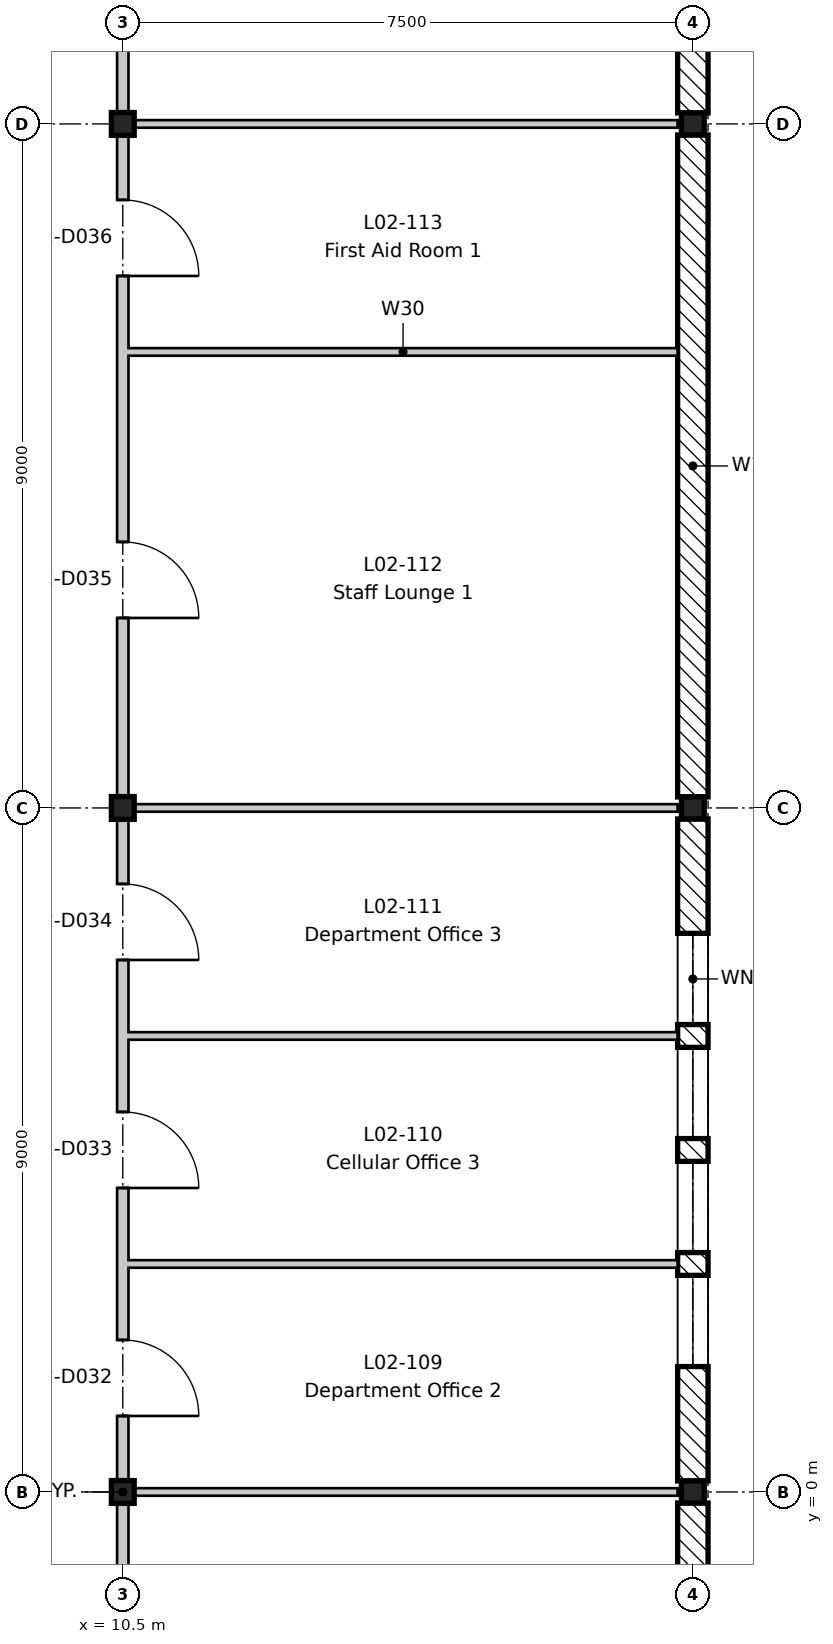
"""IFC4 building model, lengths in metres.
Left out: names, types, materials, properties, quantities, classifications, styles, units other than length and angle.
Written with IfcOpenShell. Run it as: python <this file> out.ifc"""

import sys

from ifc_helpers import new_model, si_unit, direction, frame, frame_2d, origin, origin_2d, place, context, subcontext, project, spatial, rectangle, i_section, extrude, element, fill, save


model = new_model("IFC4")
c1 = context("Model", 3, precision=1e-05, world=origin(), true_north=direction((0.0, 1.0)))
c2 = subcontext(c1, "Body", "Model", "MODEL_VIEW")
j1 = project(units=[si_unit("LENGTHUNIT", "METRE"), si_unit("PLANEANGLEUNIT", "RADIAN")], contexts=[c1])
p1 = place(None, origin())
s1 = spatial("IfcSite", under=j1, at=p1, CompositionType="ELEMENT")
p2 = place(p1, origin())
s2 = spatial("IfcBuilding", under=s1, at=p2, CompositionType="ELEMENT")
p3 = place(p2, frame((0.0, 0.0, 9.9)))
s3 = spatial("IfcBuildingStorey", under=s2, at=p3, CompositionType="ELEMENT", Elevation=9.9)
for number, where, z_axis, x_axis in (
    (1, (10.5, 0.0, -0.2), (0.0, 0.0, 1.0), (1.0, 0.0, 0.0)),
    (2, (10.5, 9.0, -0.2), (0.0, 0.0, 1.0), (1.0, 0.0, 0.0)),
    (3, (10.5, 18.0, -0.2), (0.0, 0.0, 1.0), (1.0, 0.0, 0.0)),
):
    element("IfcColumn", number, at=place(p3, frame(where, z_axis=z_axis, x_axis=x_axis)), inside=s3, PredefinedType="COLUMN", context=c2, shape_type="SweptSolid", body=[
        extrude(i_section(OverallWidth=0.3, OverallDepth=0.3, WebThickness=0.011, FlangeThickness=0.019, FilletRadius=0.027, at=origin_2d()), origin(), (0.0, 0.0, 1.0), 4.5),
    ])
for number, where, z_axis, x_axis in (
    (4, (18.0, 0.0, -0.2), (0.0, 0.0, 1.0), (1.0, 0.0, 0.0)),
    (5, (18.0, 9.0, -0.2), (0.0, 0.0, 1.0), (1.0, 0.0, 0.0)),
    (6, (18.0, 18.0, -0.2), (0.0, 0.0, 1.0), (1.0, 0.0, 0.0)),
):
    element("IfcColumn", number, at=place(p3, frame(where, z_axis=z_axis, x_axis=x_axis)), inside=s3, PredefinedType="COLUMN", context=c2, shape_type="SweptSolid", body=[
        extrude(i_section(OverallWidth=0.3, OverallDepth=0.29, WebThickness=0.009, FlangeThickness=0.014, FilletRadius=0.027, at=origin_2d()), origin(), (0.0, 0.0, 1.0), 4.5),
    ])
p4 = place(p3, frame((18.0, -0.145, 0.0), z_axis=(0.0, 0.0, 1.0), x_axis=(0.0, -1.0, 0.0)))
e7 = element("IfcWall", 7, at=p4, inside=s3, PredefinedType="STANDARD", context=c2, shape_type="SweptSolid", body=[
    extrude(rectangle(XDim=8.71, YDim=0.4, at=frame_2d((4.355, 0.0))), origin(), (0.0, 0.0, 1.0), 3.9),
])
p5 = place(p4, frame((6.005, 0.0, 0.6)))
e8 = element("IfcOpeningElement", 8, at=p5, cuts=e7, PredefinedType="OPENING", context=c2, shape_type="SweptSolid", body=[
    extrude(rectangle(XDim=1.2, YDim=3.0, at=frame_2d((0.6, 1.5))), frame((0.0, 0.21, 0.0), z_axis=(0.0, -1.0, 0.0), x_axis=(1.0, 0.0, 0.0)), (0.0, 0.0, 1.0), 0.42),
])
p6 = place(p4, frame((4.505, 0.0, 0.6)))
e9 = element("IfcOpeningElement", 9, at=p6, cuts=e7, PredefinedType="OPENING", context=c2, shape_type="SweptSolid", body=[
    extrude(rectangle(XDim=1.2, YDim=3.0, at=frame_2d((0.6, 1.5))), frame((0.0, 0.21, 0.0), z_axis=(0.0, -1.0, 0.0), x_axis=(1.0, 0.0, 0.0)), (0.0, 0.0, 1.0), 0.42),
])
p7 = place(p4, frame((3.005, 0.0, 0.6)))
e10 = element("IfcOpeningElement", 10, at=p7, cuts=e7, PredefinedType="OPENING", context=c2, shape_type="SweptSolid", body=[
    extrude(rectangle(XDim=1.2, YDim=3.0, at=frame_2d((0.6, 1.5))), frame((0.0, 0.21, 0.0), z_axis=(0.0, -1.0, 0.0), x_axis=(1.0, 0.0, 0.0)), (0.0, 0.0, 1.0), 0.42),
])
p8 = place(p4, frame((1.505, 0.0, 0.6)))
e11 = element("IfcOpeningElement", 11, at=p8, cuts=e7, PredefinedType="OPENING", context=c2, shape_type="SweptSolid", body=[
    extrude(rectangle(XDim=1.2, YDim=3.0, at=frame_2d((0.6, 1.5))), frame((0.0, 0.21, 0.0), z_axis=(0.0, -1.0, 0.0), x_axis=(1.0, 0.0, 0.0)), (0.0, 0.0, 1.0), 0.42),
])
p9 = place(p3, frame((18.0, 8.855, 0.0), z_axis=(0.0, 0.0, 1.0), x_axis=(0.0, -1.0, 0.0)))
e12 = element("IfcWall", 12, at=p9, inside=s3, PredefinedType="STANDARD", context=c2, shape_type="SweptSolid", body=[
    extrude(rectangle(XDim=8.71, YDim=0.4, at=frame_2d((4.355, 0.0))), origin(), (0.0, 0.0, 1.0), 3.9),
])
p10 = place(p9, frame((6.005, 0.0, 0.6)))
e13 = element("IfcOpeningElement", 13, at=p10, cuts=e12, PredefinedType="OPENING", context=c2, shape_type="SweptSolid", body=[
    extrude(rectangle(XDim=1.2, YDim=3.0, at=frame_2d((0.6, 1.5))), frame((0.0, 0.21, 0.0), z_axis=(0.0, -1.0, 0.0), x_axis=(1.0, 0.0, 0.0)), (0.0, 0.0, 1.0), 0.42),
])
p11 = place(p9, frame((4.505, 0.0, 0.6)))
e14 = element("IfcOpeningElement", 14, at=p11, cuts=e12, PredefinedType="OPENING", context=c2, shape_type="SweptSolid", body=[
    extrude(rectangle(XDim=1.2, YDim=3.0, at=frame_2d((0.6, 1.5))), frame((0.0, 0.21, 0.0), z_axis=(0.0, -1.0, 0.0), x_axis=(1.0, 0.0, 0.0)), (0.0, 0.0, 1.0), 0.42),
])
p12 = place(p9, frame((3.005, 0.0, 0.6)))
e15 = element("IfcOpeningElement", 15, at=p12, cuts=e12, PredefinedType="OPENING", context=c2, shape_type="SweptSolid", body=[
    extrude(rectangle(XDim=1.2, YDim=3.0, at=frame_2d((0.6, 1.5))), frame((0.0, 0.21, 0.0), z_axis=(0.0, -1.0, 0.0), x_axis=(1.0, 0.0, 0.0)), (0.0, 0.0, 1.0), 0.42),
])
p13 = place(p9, frame((1.505, 0.0, 0.6)))
e16 = element("IfcOpeningElement", 16, at=p13, cuts=e12, PredefinedType="OPENING", context=c2, shape_type="SweptSolid", body=[
    extrude(rectangle(XDim=1.2, YDim=3.0, at=frame_2d((0.6, 1.5))), frame((0.0, 0.21, 0.0), z_axis=(0.0, -1.0, 0.0), x_axis=(1.0, 0.0, 0.0)), (0.0, 0.0, 1.0), 0.42),
])
p14 = place(p3, frame((18.0, 17.855, 0.0), z_axis=(0.0, 0.0, 1.0), x_axis=(0.0, -1.0, 0.0)))
e17 = element("IfcWall", 17, at=p14, inside=s3, PredefinedType="STANDARD", context=c2, shape_type="SweptSolid", body=[
    extrude(rectangle(XDim=8.71, YDim=0.4, at=frame_2d((4.355, 0.0))), origin(), (0.0, 0.0, 1.0), 3.9),
])
p15 = place(p3, frame((18.0, 26.855, 0.0), z_axis=(0.0, 0.0, 1.0), x_axis=(0.0, -1.0, 0.0)))
e18 = element("IfcWall", 18, at=p15, inside=s3, PredefinedType="STANDARD", context=c2, shape_type="SweptSolid", body=[
    extrude(rectangle(XDim=8.71, YDim=0.4, at=frame_2d((4.355, 0.0))), origin(), (0.0, 0.0, 1.0), 3.9),
])
p16 = place(p15, frame((6.005, 0.0, 0.6)))
e19 = element("IfcOpeningElement", 19, at=p16, cuts=e18, PredefinedType="OPENING", context=c2, shape_type="SweptSolid", body=[
    extrude(rectangle(XDim=1.2, YDim=3.0, at=frame_2d((0.6, 1.5))), frame((0.0, 0.21, 0.0), z_axis=(0.0, -1.0, 0.0), x_axis=(1.0, 0.0, 0.0)), (0.0, 0.0, 1.0), 0.42),
])
p17 = place(p15, frame((4.505, 0.0, 0.6)))
e20 = element("IfcOpeningElement", 20, at=p17, cuts=e18, PredefinedType="OPENING", context=c2, shape_type="SweptSolid", body=[
    extrude(rectangle(XDim=1.2, YDim=3.0, at=frame_2d((0.6, 1.5))), frame((0.0, 0.21, 0.0), z_axis=(0.0, -1.0, 0.0), x_axis=(1.0, 0.0, 0.0)), (0.0, 0.0, 1.0), 0.42),
])
p18 = place(p15, frame((3.005, 0.0, 0.6)))
e21 = element("IfcOpeningElement", 21, at=p18, cuts=e18, PredefinedType="OPENING", context=c2, shape_type="SweptSolid", body=[
    extrude(rectangle(XDim=1.2, YDim=3.0, at=frame_2d((0.6, 1.5))), frame((0.0, 0.21, 0.0), z_axis=(0.0, -1.0, 0.0), x_axis=(1.0, 0.0, 0.0)), (0.0, 0.0, 1.0), 0.42),
])
p19 = place(p15, frame((1.505, 0.0, 0.6)))
e22 = element("IfcOpeningElement", 22, at=p19, cuts=e18, PredefinedType="OPENING", context=c2, shape_type="SweptSolid", body=[
    extrude(rectangle(XDim=1.2, YDim=3.0, at=frame_2d((0.6, 1.5))), frame((0.0, 0.21, 0.0), z_axis=(0.0, -1.0, 0.0), x_axis=(1.0, 0.0, 0.0)), (0.0, 0.0, 1.0), 0.42),
])
p20 = place(p3, frame((10.575, 0.0, 0.0), z_axis=(0.0, 0.0, 1.0), x_axis=(1.0, 0.0, 0.0)))
e23 = element("IfcWall", 23, at=p20, inside=s3, PredefinedType="PARTITIONING", context=c2, shape_type="SweptSolid", body=[
    extrude(rectangle(XDim=7.225, YDim=0.1, at=frame_2d((3.613, 0.0))), origin(), (0.0, 0.0, 1.0), 3.95),
])
for number, where, z_axis, x_axis in (
    (24, (10.575, 3.0, 0.0), (0.0, 0.0, 1.0), (1.0, 0.0, 0.0)),
    (25, (10.575, 6.0, 0.0), (0.0, 0.0, 1.0), (1.0, 0.0, 0.0)),
):
    element("IfcWall", number, at=place(p3, frame(where, z_axis=z_axis, x_axis=x_axis)), inside=s3, PredefinedType="PARTITIONING", context=c2, shape_type="SweptSolid", body=[
        extrude(rectangle(XDim=7.225, YDim=0.1, at=frame_2d((3.613, 0.0))), origin(), (0.0, 0.0, 1.0), 4.3),
    ])
p21 = place(p3, frame((10.575, 9.0, 0.0), z_axis=(0.0, 0.0, 1.0), x_axis=(1.0, 0.0, 0.0)))
e26 = element("IfcWall", 26, at=p21, inside=s3, PredefinedType="PARTITIONING", context=c2, shape_type="SweptSolid", body=[
    extrude(rectangle(XDim=7.225, YDim=0.1, at=frame_2d((3.613, 0.0))), origin(), (0.0, 0.0, 1.0), 3.95),
])
p22 = place(p3, frame((10.575, 15.0, 0.0), z_axis=(0.0, 0.0, 1.0), x_axis=(1.0, 0.0, 0.0)))
e27 = element("IfcWall", 27, at=p22, inside=s3, PredefinedType="PARTITIONING", context=c2, shape_type="SweptSolid", body=[
    extrude(rectangle(XDim=7.225, YDim=0.1, at=frame_2d((3.613, 0.0))), origin(), (0.0, 0.0, 1.0), 4.3),
])
p23 = place(p3, frame((10.575, 18.0, 0.0), z_axis=(0.0, 0.0, 1.0), x_axis=(1.0, 0.0, 0.0)))
e28 = element("IfcWall", 28, at=p23, inside=s3, PredefinedType="PARTITIONING", context=c2, shape_type="SweptSolid", body=[
    extrude(rectangle(XDim=7.225, YDim=0.1, at=frame_2d((3.613, 0.0))), origin(), (0.0, 0.0, 1.0), 3.95),
])
p24 = place(p3, frame((10.5, -8.8, 0.0), z_axis=(0.0, 0.0, 1.0), x_axis=(0.0, 1.0, 0.0)))
e29 = element("IfcWall", 29, at=p24, inside=s3, PredefinedType="PARTITIONING", context=c2, shape_type="SweptSolid", body=[
    extrude(rectangle(XDim=79.3, YDim=0.15, at=frame_2d((39.65, 0.0))), origin(), (0.0, 0.0, 1.0), 3.78),
])
p25 = place(p24, frame((0.8, 0.0, 0.0)))
e30 = element("IfcOpeningElement", 30, at=p25, cuts=e29, PredefinedType="OPENING", context=c2, shape_type="SweptSolid", body=[
    extrude(rectangle(XDim=1.0, YDim=2.1, at=frame_2d((0.5, 1.05))), frame((0.0, 0.085, 0.0), z_axis=(0.0, -1.0, 0.0), x_axis=(1.0, 0.0, 0.0)), (0.0, 0.0, 1.0), 0.17),
])
p26 = place(p24, frame((5.3, 0.0, 0.0)))
e31 = element("IfcOpeningElement", 31, at=p26, cuts=e29, PredefinedType="OPENING", context=c2, shape_type="SweptSolid", body=[
    extrude(rectangle(XDim=1.0, YDim=2.1, at=frame_2d((0.5, 1.05))), frame((0.0, 0.085, 0.0), z_axis=(0.0, -1.0, 0.0), x_axis=(1.0, 0.0, 0.0)), (0.0, 0.0, 1.0), 0.17),
])
p27 = place(p24, frame((9.8, 0.0, 0.0)))
e32 = element("IfcOpeningElement", 32, at=p27, cuts=e29, PredefinedType="OPENING", context=c2, shape_type="SweptSolid", body=[
    extrude(rectangle(XDim=1.0, YDim=2.1, at=frame_2d((0.5, 1.05))), frame((0.0, 0.085, 0.0), z_axis=(0.0, -1.0, 0.0), x_axis=(1.0, 0.0, 0.0)), (0.0, 0.0, 1.0), 0.17),
])
p28 = place(p24, frame((12.8, 0.0, 0.0)))
e33 = element("IfcOpeningElement", 33, at=p28, cuts=e29, PredefinedType="OPENING", context=c2, shape_type="SweptSolid", body=[
    extrude(rectangle(XDim=1.0, YDim=2.1, at=frame_2d((0.5, 1.05))), frame((0.0, 0.085, 0.0), z_axis=(0.0, -1.0, 0.0), x_axis=(1.0, 0.0, 0.0)), (0.0, 0.0, 1.0), 0.17),
])
p29 = place(p24, frame((15.8, 0.0, 0.0)))
e34 = element("IfcOpeningElement", 34, at=p29, cuts=e29, PredefinedType="OPENING", context=c2, shape_type="SweptSolid", body=[
    extrude(rectangle(XDim=1.0, YDim=2.1, at=frame_2d((0.5, 1.05))), frame((0.0, 0.085, 0.0), z_axis=(0.0, -1.0, 0.0), x_axis=(1.0, 0.0, 0.0)), (0.0, 0.0, 1.0), 0.17),
])
p30 = place(p24, frame((20.3, 0.0, 0.0)))
e35 = element("IfcOpeningElement", 35, at=p30, cuts=e29, PredefinedType="OPENING", context=c2, shape_type="SweptSolid", body=[
    extrude(rectangle(XDim=1.0, YDim=2.1, at=frame_2d((0.5, 1.05))), frame((0.0, 0.085, 0.0), z_axis=(0.0, -1.0, 0.0), x_axis=(1.0, 0.0, 0.0)), (0.0, 0.0, 1.0), 0.17),
])
p31 = place(p24, frame((24.8, 0.0, 0.0)))
e36 = element("IfcOpeningElement", 36, at=p31, cuts=e29, PredefinedType="OPENING", context=c2, shape_type="SweptSolid", body=[
    extrude(rectangle(XDim=1.0, YDim=2.1, at=frame_2d((0.5, 1.05))), frame((0.0, 0.085, 0.0), z_axis=(0.0, -1.0, 0.0), x_axis=(1.0, 0.0, 0.0)), (0.0, 0.0, 1.0), 0.17),
])
p32 = place(p24, frame((27.8, 0.0, 0.0)))
e37 = element("IfcOpeningElement", 37, at=p32, cuts=e29, PredefinedType="OPENING", context=c2, shape_type="SweptSolid", body=[
    extrude(rectangle(XDim=1.0, YDim=2.1, at=frame_2d((0.5, 1.05))), frame((0.0, 0.085, 0.0), z_axis=(0.0, -1.0, 0.0), x_axis=(1.0, 0.0, 0.0)), (0.0, 0.0, 1.0), 0.17),
])
p33 = place(p24, frame((32.3, 0.0, 0.0)))
e38 = element("IfcOpeningElement", 38, at=p33, cuts=e29, PredefinedType="OPENING", context=c2, shape_type="SweptSolid", body=[
    extrude(rectangle(XDim=1.0, YDim=2.1, at=frame_2d((0.5, 1.05))), frame((0.0, 0.085, 0.0), z_axis=(0.0, -1.0, 0.0), x_axis=(1.0, 0.0, 0.0)), (0.0, 0.0, 1.0), 0.17),
])
p34 = place(p24, frame((38.3, 0.0, 0.0)))
e39 = element("IfcOpeningElement", 39, at=p34, cuts=e29, PredefinedType="OPENING", context=c2, shape_type="SweptSolid", body=[
    extrude(rectangle(XDim=1.0, YDim=2.1, at=frame_2d((0.5, 1.05))), frame((0.0, 0.085, 0.0), z_axis=(0.0, -1.0, 0.0), x_axis=(1.0, 0.0, 0.0)), (0.0, 0.0, 1.0), 0.17),
])
p35 = place(p24, frame((42.8, 0.0, 0.0)))
e40 = element("IfcOpeningElement", 40, at=p35, cuts=e29, PredefinedType="OPENING", context=c2, shape_type="SweptSolid", body=[
    extrude(rectangle(XDim=1.0, YDim=2.1, at=frame_2d((0.5, 1.05))), frame((0.0, 0.085, 0.0), z_axis=(0.0, -1.0, 0.0), x_axis=(1.0, 0.0, 0.0)), (0.0, 0.0, 1.0), 0.17),
])
p36 = place(p24, frame((45.8, 0.0, 0.0)))
e41 = element("IfcOpeningElement", 41, at=p36, cuts=e29, PredefinedType="OPENING", context=c2, shape_type="SweptSolid", body=[
    extrude(rectangle(XDim=1.0, YDim=2.1, at=frame_2d((0.5, 1.05))), frame((0.0, 0.085, 0.0), z_axis=(0.0, -1.0, 0.0), x_axis=(1.0, 0.0, 0.0)), (0.0, 0.0, 1.0), 0.17),
])
p37 = place(p24, frame((50.3, 0.0, 0.0)))
e42 = element("IfcOpeningElement", 42, at=p37, cuts=e29, PredefinedType="OPENING", context=c2, shape_type="SweptSolid", body=[
    extrude(rectangle(XDim=1.0, YDim=2.1, at=frame_2d((0.5, 1.05))), frame((0.0, 0.085, 0.0), z_axis=(0.0, -1.0, 0.0), x_axis=(1.0, 0.0, 0.0)), (0.0, 0.0, 1.0), 0.17),
])
p38 = place(p24, frame((54.8, 0.0, 0.0)))
e43 = element("IfcOpeningElement", 43, at=p38, cuts=e29, PredefinedType="OPENING", context=c2, shape_type="SweptSolid", body=[
    extrude(rectangle(XDim=1.0, YDim=2.1, at=frame_2d((0.5, 1.05))), frame((0.0, 0.085, 0.0), z_axis=(0.0, -1.0, 0.0), x_axis=(1.0, 0.0, 0.0)), (0.0, 0.0, 1.0), 0.17),
])
p39 = place(p24, frame((57.8, 0.0, 0.0)))
e44 = element("IfcOpeningElement", 44, at=p39, cuts=e29, PredefinedType="OPENING", context=c2, shape_type="SweptSolid", body=[
    extrude(rectangle(XDim=1.0, YDim=2.1, at=frame_2d((0.5, 1.05))), frame((0.0, 0.085, 0.0), z_axis=(0.0, -1.0, 0.0), x_axis=(1.0, 0.0, 0.0)), (0.0, 0.0, 1.0), 0.17),
])
p40 = place(p24, frame((63.6, 0.0, 0.0)))
e45 = element("IfcOpeningElement", 45, at=p40, cuts=e29, PredefinedType="OPENING", context=c2, shape_type="SweptSolid", body=[
    extrude(rectangle(XDim=1.4, YDim=2.1, at=frame_2d((0.7, 1.05))), frame((0.0, 0.085, 0.0), z_axis=(0.0, -1.0, 0.0), x_axis=(1.0, 0.0, 0.0)), (0.0, 0.0, 1.0), 0.17),
])
p41 = place(p24, frame((69.8, 0.0, 0.0)))
e46 = element("IfcOpeningElement", 46, at=p41, cuts=e29, PredefinedType="OPENING", context=c2, shape_type="SweptSolid", body=[
    extrude(rectangle(XDim=1.0, YDim=2.1, at=frame_2d((0.5, 1.05))), frame((0.0, 0.085, 0.0), z_axis=(0.0, -1.0, 0.0), x_axis=(1.0, 0.0, 0.0)), (0.0, 0.0, 1.0), 0.17),
])
p42 = place(p24, frame((72.8, 0.0, 0.0)))
e47 = element("IfcOpeningElement", 47, at=p42, cuts=e29, PredefinedType="OPENING", context=c2, shape_type="SweptSolid", body=[
    extrude(rectangle(XDim=1.0, YDim=2.1, at=frame_2d((0.5, 1.05))), frame((0.0, 0.085, 0.0), z_axis=(0.0, -1.0, 0.0), x_axis=(1.0, 0.0, 0.0)), (0.0, 0.0, 1.0), 0.17),
])
p43 = place(p10, origin())
e48 = element("IfcWindow", 48, at=p43, inside=s3, PartitioningType="SINGLE_PANEL", PredefinedType="WINDOW", context=c2, shape_type="SweptSolid", body=[
    extrude(rectangle(XDim=1.2, YDim=3.0, at=frame_2d((0.6, 1.5))), frame((0.0, 0.03, 0.0), z_axis=(0.0, -1.0, 0.0), x_axis=(1.0, 0.0, 0.0)), (0.0, 0.0, 1.0), 0.06),
])
fill(e13, e48)
p44 = place(p11, origin())
e49 = element("IfcWindow", 49, at=p44, inside=s3, PartitioningType="SINGLE_PANEL", PredefinedType="WINDOW", context=c2, shape_type="SweptSolid", body=[
    extrude(rectangle(XDim=1.2, YDim=3.0, at=frame_2d((0.6, 1.5))), frame((0.0, 0.03, 0.0), z_axis=(0.0, -1.0, 0.0), x_axis=(1.0, 0.0, 0.0)), (0.0, 0.0, 1.0), 0.06),
])
fill(e14, e49)
p45 = place(p12, origin())
e50 = element("IfcWindow", 50, at=p45, inside=s3, PartitioningType="SINGLE_PANEL", PredefinedType="WINDOW", context=c2, shape_type="SweptSolid", body=[
    extrude(rectangle(XDim=1.2, YDim=3.0, at=frame_2d((0.6, 1.5))), frame((0.0, 0.03, 0.0), z_axis=(0.0, -1.0, 0.0), x_axis=(1.0, 0.0, 0.0)), (0.0, 0.0, 1.0), 0.06),
])
fill(e15, e50)
p46 = place(p13, origin())
e51 = element("IfcWindow", 51, at=p46, inside=s3, PartitioningType="SINGLE_PANEL", PredefinedType="WINDOW", context=c2, shape_type="SweptSolid", body=[
    extrude(rectangle(XDim=1.2, YDim=3.0, at=frame_2d((0.6, 1.5))), frame((0.0, 0.03, 0.0), z_axis=(0.0, -1.0, 0.0), x_axis=(1.0, 0.0, 0.0)), (0.0, 0.0, 1.0), 0.06),
])
fill(e16, e51)
p47 = place(p27, frame((1.0, 0.0, 0.0), z_axis=(0.0, 0.0, 1.0), x_axis=(-1.0, 0.0, 0.0)))
e52 = element("IfcDoor", 52, at=p47, inside=s3, OperationType="SINGLE_SWING_RIGHT", PredefinedType="DOOR", context=c2, shape_type="SweptSolid", body=[
    extrude(rectangle(XDim=1.0, YDim=2.1, at=frame_2d((0.5, 1.05))), frame((0.0, 0.025, 0.0), z_axis=(0.0, -1.0, 0.0), x_axis=(1.0, 0.0, 0.0)), (0.0, 0.0, 1.0), 0.05),
])
fill(e32, e52)
p48 = place(p28, frame((1.0, 0.0, 0.0), z_axis=(0.0, 0.0, 1.0), x_axis=(-1.0, 0.0, 0.0)))
e53 = element("IfcDoor", 53, at=p48, inside=s3, OperationType="SINGLE_SWING_RIGHT", PredefinedType="DOOR", context=c2, shape_type="SweptSolid", body=[
    extrude(rectangle(XDim=1.0, YDim=2.1, at=frame_2d((0.5, 1.05))), frame((0.0, 0.025, 0.0), z_axis=(0.0, -1.0, 0.0), x_axis=(1.0, 0.0, 0.0)), (0.0, 0.0, 1.0), 0.05),
])
fill(e33, e53)
p49 = place(p29, frame((1.0, 0.0, 0.0), z_axis=(0.0, 0.0, 1.0), x_axis=(-1.0, 0.0, 0.0)))
e54 = element("IfcDoor", 54, at=p49, inside=s3, OperationType="SINGLE_SWING_RIGHT", PredefinedType="DOOR", context=c2, shape_type="SweptSolid", body=[
    extrude(rectangle(XDim=1.0, YDim=2.1, at=frame_2d((0.5, 1.05))), frame((0.0, 0.025, 0.0), z_axis=(0.0, -1.0, 0.0), x_axis=(1.0, 0.0, 0.0)), (0.0, 0.0, 1.0), 0.05),
])
fill(e34, e54)
p50 = place(p30, frame((1.0, 0.0, 0.0), z_axis=(0.0, 0.0, 1.0), x_axis=(-1.0, 0.0, 0.0)))
e55 = element("IfcDoor", 55, at=p50, inside=s3, OperationType="SINGLE_SWING_RIGHT", PredefinedType="DOOR", context=c2, shape_type="SweptSolid", body=[
    extrude(rectangle(XDim=1.0, YDim=2.1, at=frame_2d((0.5, 1.05))), frame((0.0, 0.025, 0.0), z_axis=(0.0, -1.0, 0.0), x_axis=(1.0, 0.0, 0.0)), (0.0, 0.0, 1.0), 0.05),
])
fill(e35, e55)
p51 = place(p31, frame((1.0, 0.0, 0.0), z_axis=(0.0, 0.0, 1.0), x_axis=(-1.0, 0.0, 0.0)))
e56 = element("IfcDoor", 56, at=p51, inside=s3, OperationType="SINGLE_SWING_RIGHT", PredefinedType="DOOR", context=c2, shape_type="SweptSolid", body=[
    extrude(rectangle(XDim=1.0, YDim=2.1, at=frame_2d((0.5, 1.05))), frame((0.0, 0.025, 0.0), z_axis=(0.0, -1.0, 0.0), x_axis=(1.0, 0.0, 0.0)), (0.0, 0.0, 1.0), 0.05),
])
fill(e36, e56)
save(model, sys.argv[1])
